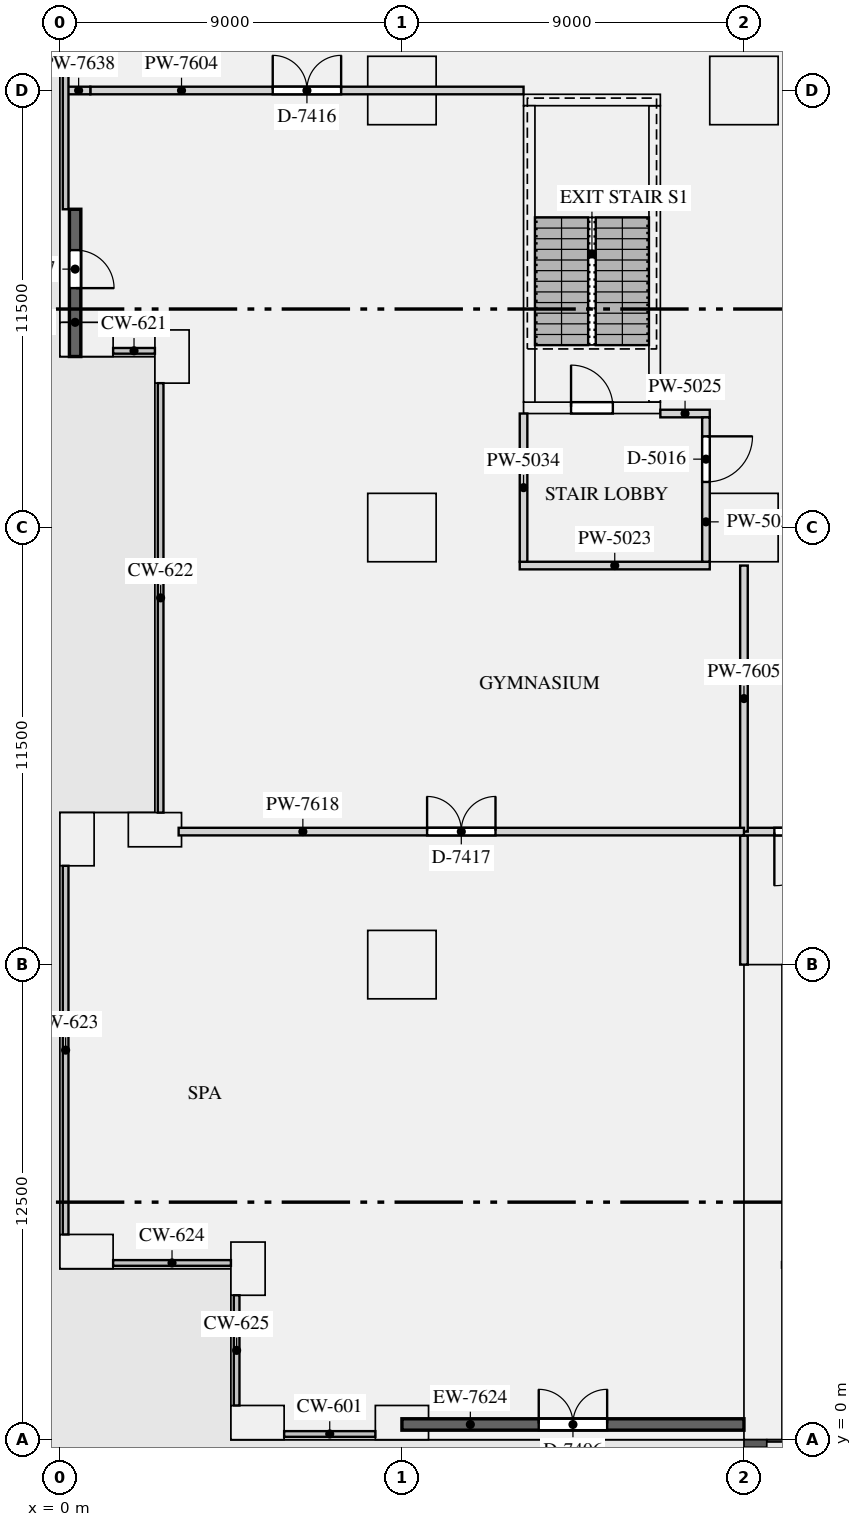
"""IFC4 building model, lengths in metres.
Left out: names, types, materials, properties, quantities, classifications, styles, units other than length and angle.
Written with IfcOpenShell. Run it as: python <this file> out.ifc"""

import sys

from ifc_helpers import new_model, si_unit, direction, frame, frame_2d, origin, origin_2d, place, context, subcontext, project, spatial, rectangle, extrude, element, fill, save


model = new_model("IFC4")
c1 = context("Model", 3, precision=1e-05, world=origin(), true_north=direction((0.0, 1.0)))
c2 = subcontext(c1, "Body", "Model", "MODEL_VIEW")
j1 = project(units=[si_unit("LENGTHUNIT", "METRE"), si_unit("PLANEANGLEUNIT", "RADIAN")], contexts=[c1])
p1 = place(None, origin())
s1 = spatial("IfcSite", under=j1, at=p1, CompositionType="ELEMENT")
p2 = place(p1, origin())
s2 = spatial("IfcBuilding", under=s1, at=p2, CompositionType="ELEMENT")
p3 = place(p2, frame((0.0, 0.0, 11.0)))
s3 = spatial("IfcBuildingStorey", under=s2, at=p3, CompositionType="ELEMENT", Elevation=11.0)
for number, where, z_axis, x_axis in (
    (1, (9.0, 0.45, 0.0), (0.0, 0.0, 1.0), (1.0, 0.0, 0.0)),
    (2, (0.7, 28.95, 0.0), (0.0, 0.0, 1.0), (1.0, 0.0, 0.0)),
    (3, (2.95, 28.5, 0.0), (0.0, 0.0, 1.0), (0.0, -1.0, 0.0)),
    (4, (2.5, 16.05, 0.0), (0.0, 0.0, 1.0), (-1.0, 0.0, 0.0)),
    (5, (0.45, 15.8, 0.0), (0.0, 0.0, 1.0), (0.0, -1.0, 0.0)),
    (6, (0.7, 4.95, 0.0), (0.0, 0.0, 1.0), (1.0, 0.0, 0.0)),
    (7, (4.95, 4.5, 0.0), (0.0, 0.0, 1.0), (0.0, -1.0, 0.0)),
    (8, (5.2, 0.45, 0.0), (0.0, 0.0, 1.0), (1.0, 0.0, 0.0)),
):
    element("IfcColumn", number, at=place(p3, frame(where, z_axis=z_axis, x_axis=x_axis)), inside=s3, PredefinedType="USERDEFINED", context=c2, shape_type="SweptSolid", body=[
        extrude(rectangle(XDim=1.4, YDim=0.9, at=origin_2d()), origin(), (0.0, 0.0, 1.0), 4.5),
    ])
for number, where, z_axis, x_axis in (
    (9, (9.0, 12.5, 0.0), (0.0, 0.0, 1.0), (1.0, 0.0, 0.0)),
    (10, (9.0, 24.0, 0.0), (0.0, 0.0, 1.0), (1.0, 0.0, 0.0)),
    (11, (9.0, 35.5, 0.0), (0.0, 0.0, 1.0), (1.0, 0.0, 0.0)),
    (12, (18.0, 24.0, 0.0), (0.0, 0.0, 1.0), (1.0, 0.0, 0.0)),
    (13, (18.0, 35.5, 0.0), (0.0, 0.0, 1.0), (1.0, 0.0, 0.0)),
):
    element("IfcColumn", number, at=place(p3, frame(where, z_axis=z_axis, x_axis=x_axis)), inside=s3, PredefinedType="COLUMN", context=c2, shape_type="SweptSolid", body=[
        extrude(rectangle(XDim=1.8, YDim=1.8, at=origin_2d()), origin(), (0.0, 0.0, 1.0), 4.5),
    ])
p4 = place(p3, frame((18.5, 0.0, 0.0), z_axis=(0.0, 0.0, 1.0), x_axis=(0.0, 1.0, 0.0)))
e14 = element("IfcWall", 14, at=p4, inside=s3, PredefinedType="SHEAR", context=c2, shape_type="SweptSolid", body=[
    extrude(rectangle(XDim=12.5, YDim=1.0, at=frame_2d((6.25, 0.0))), origin(), (0.0, 0.0, 1.0), 4.5),
])
p5 = place(p3, frame((12.2, 27.15, 0.0), z_axis=(0.0, 0.0, 1.0), x_axis=(1.0, 0.0, 0.0)))
e15 = element("IfcWall", 15, at=p5, inside=s3, PredefinedType="SHEAR", context=c2, shape_type="SweptSolid", body=[
    extrude(rectangle(XDim=3.6, YDim=0.3, at=frame_2d((1.8, 0.0))), origin(), (0.0, 0.0, 1.0), 4.5),
])
p6 = place(p5, frame((1.25, 0.0, 0.0)))
e16 = element("IfcOpeningElement", 16, at=p6, cuts=e15, PredefinedType="OPENING", context=c2, shape_type="SweptSolid", body=[
    extrude(rectangle(XDim=1.1, YDim=2.1, at=frame_2d((0.55, 1.05))), frame((0.0, 0.16, 0.0), z_axis=(0.0, -1.0, 0.0), x_axis=(1.0, 0.0, 0.0)), (0.0, 0.0, 1.0), 0.32),
])
p7 = place(p3, frame((12.2, 35.25, 0.0), z_axis=(0.0, 0.0, 1.0), x_axis=(1.0, 0.0, 0.0)))
e17 = element("IfcWall", 17, at=p7, inside=s3, PredefinedType="SHEAR", context=c2, shape_type="SweptSolid", body=[
    extrude(rectangle(XDim=3.6, YDim=0.3, at=frame_2d((1.8, 0.0))), origin(), (0.0, 0.0, 1.0), 4.5),
])
for number, where, z_axis, x_axis in (
    (18, (12.35, 27.3, 0.0), (0.0, 0.0, 1.0), (0.0, 1.0, 0.0)),
    (19, (15.65, 27.3, 0.0), (0.0, 0.0, 1.0), (0.0, 1.0, 0.0)),
):
    element("IfcWall", number, at=place(p3, frame(where, z_axis=z_axis, x_axis=x_axis)), inside=s3, PredefinedType="SHEAR", context=c2, shape_type="SweptSolid", body=[
        extrude(rectangle(XDim=7.8, YDim=0.3, at=frame_2d((3.9, 0.0))), origin(), (0.0, 0.0, 1.0), 4.5),
    ])
p8 = place(p3, frame((19.0, 4.6, 0.0), z_axis=(0.0, 0.0, 1.0), x_axis=(1.0, 0.0, 0.0)))
e20 = element("IfcWall", 20, at=p8, inside=s3, PredefinedType="PARTITIONING", context=c2, shape_type="SweptSolid", body=[
    extrude(rectangle(XDim=8.3, YDim=0.15, at=frame_2d((4.15, 0.0))), origin(), (0.0, 0.0, 1.0), 3.9),
])
p9 = place(p8, frame((0.45, 0.0, 0.0)))
e21 = element("IfcOpeningElement", 21, at=p9, cuts=e20, PredefinedType="OPENING", context=c2, shape_type="SweptSolid", body=[
    extrude(rectangle(XDim=0.9, YDim=2.1, at=frame_2d((0.45, 1.05))), frame((0.0, 0.085, 0.0), z_axis=(0.0, -1.0, 0.0), x_axis=(1.0, 0.0, 0.0)), (0.0, 0.0, 1.0), 0.17),
])
p10 = place(p3, frame((12.1, 23.0, 0.0), z_axis=(0.0, 0.0, 1.0), x_axis=(1.0, 0.0, 0.0)))
e22 = element("IfcWall", 22, at=p10, inside=s3, PredefinedType="PARTITIONING", context=c2, shape_type="SweptSolid", body=[
    extrude(rectangle(XDim=5.0, YDim=0.2, at=frame_2d((2.5, 0.0))), origin(), (0.0, 0.0, 1.0), 3.9),
])
p11 = place(p3, frame((15.8, 27.0, 0.0), z_axis=(0.0, 0.0, 1.0), x_axis=(1.0, 0.0, 0.0)))
e23 = element("IfcWall", 23, at=p11, inside=s3, PredefinedType="PARTITIONING", context=c2, shape_type="SweptSolid", body=[
    extrude(rectangle(XDim=1.3, YDim=0.2, at=frame_2d((0.65, 0.0))), origin(), (0.0, 0.0, 1.0), 3.9),
])
p12 = place(p3, frame((18.0, 12.5, 0.0), z_axis=(0.0, 0.0, 1.0), x_axis=(0.0, 1.0, 0.0)))
e24 = element("IfcWall", 24, at=p12, inside=s3, PredefinedType="PARTITIONING", context=c2, shape_type="SweptSolid", body=[
    extrude(rectangle(XDim=3.4, YDim=0.2, at=frame_2d((1.7, 0.0))), origin(), (0.0, 0.0, 1.0), 3.9),
])
p13 = place(p3, frame((12.2, 23.1, 0.0), z_axis=(0.0, 0.0, 1.0), x_axis=(0.0, 1.0, 0.0)))
e25 = element("IfcWall", 25, at=p13, inside=s3, PredefinedType="PARTITIONING", context=c2, shape_type="SweptSolid", body=[
    extrude(rectangle(XDim=3.9, YDim=0.2, at=frame_2d((1.95, 0.0))), origin(), (0.0, 0.0, 1.0), 3.9),
])
p14 = place(p3, frame((17.0, 23.1, 0.0), z_axis=(0.0, 0.0, 1.0), x_axis=(0.0, 1.0, 0.0)))
e26 = element("IfcWall", 26, at=p14, inside=s3, PredefinedType="PARTITIONING", context=c2, shape_type="SweptSolid", body=[
    extrude(rectangle(XDim=3.8, YDim=0.2, at=frame_2d((1.9, 0.0))), origin(), (0.0, 0.0, 1.0), 3.9),
])
p15 = place(p14, frame((2.1, 0.0, 0.0)))
e27 = element("IfcOpeningElement", 27, at=p15, cuts=e26, PredefinedType="OPENING", context=c2, shape_type="SweptSolid", body=[
    extrude(rectangle(XDim=1.2, YDim=2.1, at=frame_2d((0.6, 1.05))), frame((0.0, 0.11, 0.0), z_axis=(0.0, -1.0, 0.0), x_axis=(1.0, 0.0, 0.0)), (0.0, 0.0, 1.0), 0.22),
])
p16 = place(p3, frame((17.9, 16.0, 0.0), z_axis=(0.0, 0.0, 1.0), x_axis=(1.0, 0.0, 0.0)))
e28 = element("IfcWall", 28, at=p16, inside=s3, PredefinedType="PARTITIONING", context=c2, shape_type="SweptSolid", body=[
    extrude(rectangle(XDim=36.2, YDim=0.2, at=frame_2d((18.1, 0.0))), origin(), (0.0, 0.0, 1.0), 3.9),
])
p17 = place(p16, frame((0.9, 0.0, 0.0)))
e29 = element("IfcOpeningElement", 29, at=p17, cuts=e28, PredefinedType="OPENING", context=c2, shape_type="SweptSolid", body=[
    extrude(rectangle(XDim=1.4, YDim=2.1, at=frame_2d((0.7, 1.05))), frame((0.0, 0.11, 0.0), z_axis=(0.0, -1.0, 0.0), x_axis=(1.0, 0.0, 0.0)), (0.0, 0.0, 1.0), 0.22),
])
p18 = place(p16, frame((33.9, 0.0, 0.0)))
e30 = element("IfcOpeningElement", 30, at=p18, cuts=e28, PredefinedType="OPENING", context=c2, shape_type="SweptSolid", body=[
    extrude(rectangle(XDim=1.4, YDim=2.1, at=frame_2d((0.7, 1.05))), frame((0.0, 0.11, 0.0), z_axis=(0.0, -1.0, 0.0), x_axis=(1.0, 0.0, 0.0)), (0.0, 0.0, 1.0), 0.22),
])
p19 = place(p3, frame((0.8, 35.5, 0.0), z_axis=(0.0, 0.0, 1.0), x_axis=(1.0, 0.0, 0.0)))
e31 = element("IfcWall", 31, at=p19, inside=s3, PredefinedType="PARTITIONING", context=c2, shape_type="SweptSolid", body=[
    extrude(rectangle(XDim=11.4, YDim=0.2, at=frame_2d((5.7, 0.0))), origin(), (0.0, 0.0, 1.0), 3.9),
])
p20 = place(p19, frame((4.8, 0.0, 0.0)))
e32 = element("IfcOpeningElement", 32, at=p20, cuts=e31, PredefinedType="OPENING", context=c2, shape_type="SweptSolid", body=[
    extrude(rectangle(XDim=1.8, YDim=2.4, at=frame_2d((0.9, 1.2))), frame((0.0, 0.11, 0.0), z_axis=(0.0, -1.0, 0.0), x_axis=(1.0, 0.0, 0.0)), (0.0, 0.0, 1.0), 0.22),
])
p21 = place(p3, frame((18.0, 16.0, 0.0), z_axis=(0.0, 0.0, 1.0), x_axis=(0.0, 1.0, 0.0)))
e33 = element("IfcWall", 33, at=p21, inside=s3, PredefinedType="PARTITIONING", context=c2, shape_type="SweptSolid", body=[
    extrude(rectangle(XDim=7.0, YDim=0.2, at=frame_2d((3.5, 0.0))), origin(), (0.0, 0.0, 1.0), 3.9),
])
p22 = place(p3, frame((3.124, 16.0, 0.0), z_axis=(0.0, 0.0, 1.0), x_axis=(1.0, 0.0, 0.0)))
e34 = element("IfcWall", 34, at=p22, inside=s3, PredefinedType="PARTITIONING", context=c2, shape_type="SweptSolid", body=[
    extrude(rectangle(XDim=14.876, YDim=0.2, at=frame_2d((7.438, 0.0))), origin(), (0.0, 0.0, 1.0), 3.9),
])
p23 = place(p22, frame((6.538, 0.0, 0.0)))
e35 = element("IfcOpeningElement", 35, at=p23, cuts=e34, PredefinedType="OPENING", context=c2, shape_type="SweptSolid", body=[
    extrude(rectangle(XDim=1.8, YDim=2.4, at=frame_2d((0.9, 1.2))), frame((0.0, 0.11, 0.0), z_axis=(0.0, -1.0, 0.0), x_axis=(1.0, 0.0, 0.0)), (0.0, 0.0, 1.0), 0.22),
])
p24 = place(p3, frame((9.0, 0.4, 0.0), z_axis=(0.0, 0.0, 1.0), x_axis=(1.0, 0.0, 0.0)))
e36 = element("IfcWall", 36, at=p24, inside=s3, PredefinedType="SOLIDWALL", context=c2, shape_type="SweptSolid", body=[
    extrude(rectangle(XDim=9.0, YDim=0.3, at=frame_2d((4.5, 0.0))), origin(), (0.0, 0.0, 1.0), 3.9),
])
p25 = place(p24, frame((3.6, 0.0, 0.0)))
e37 = element("IfcOpeningElement", 37, at=p25, cuts=e36, PredefinedType="OPENING", context=c2, shape_type="SweptSolid", body=[
    extrude(rectangle(XDim=1.8, YDim=2.4, at=frame_2d((0.9, 1.2))), frame((0.0, 0.16, 0.0), z_axis=(0.0, -1.0, 0.0), x_axis=(1.0, 0.0, 0.0)), (0.0, 0.0, 1.0), 0.32),
])
p26 = place(p3, frame((0.4, 28.5, 0.0), z_axis=(0.0, 0.0, 1.0), x_axis=(0.0, 1.0, 0.0)))
e38 = element("IfcWall", 38, at=p26, inside=s3, PredefinedType="SOLIDWALL", context=c2, shape_type="SweptSolid", body=[
    extrude(rectangle(XDim=3.875, YDim=0.3, at=frame_2d((1.938, 0.0))), origin(), (0.0, 0.0, 1.0), 3.9),
])
p27 = place(p26, frame((1.8, 0.0, 0.0)))
e39 = element("IfcOpeningElement", 39, at=p27, cuts=e38, PredefinedType="OPENING", context=c2, shape_type="SweptSolid", body=[
    extrude(rectangle(XDim=1.0, YDim=2.1, at=frame_2d((0.5, 1.05))), frame((0.0, 0.16, 0.0), z_axis=(0.0, -1.0, 0.0), x_axis=(1.0, 0.0, 0.0)), (0.0, 0.0, 1.0), 0.32),
])
p28 = place(p3, frame((0.185, 35.5, 0.0), z_axis=(0.0, 0.0, 1.0), x_axis=(1.0, 0.0, 0.0)))
e40 = element("IfcWall", 40, at=p28, inside=s3, PredefinedType="PARTITIONING", context=c2, shape_type="SweptSolid", body=[
    extrude(rectangle(XDim=0.615, YDim=0.2, at=frame_2d((0.308, 0.0))), origin(), (0.0, 0.0, 1.0), 3.9),
])
p29 = place(p6, origin())
e41 = element("IfcDoor", 41, at=p29, inside=s3, OperationType="SINGLE_SWING_LEFT", PredefinedType="DOOR", context=c2, shape_type="SweptSolid", body=[
    extrude(rectangle(XDim=1.1, YDim=2.1, at=frame_2d((0.55, 1.05))), frame((0.0, 0.025, 0.0), z_axis=(0.0, -1.0, 0.0), x_axis=(1.0, 0.0, 0.0)), (0.0, 0.0, 1.0), 0.05),
])
fill(e16, e41)
p30 = place(p15, frame((1.2, 0.0, 0.0), z_axis=(0.0, 0.0, 1.0), x_axis=(-1.0, 0.0, 0.0)))
e42 = element("IfcDoor", 42, at=p30, inside=s3, OperationType="SINGLE_SWING_LEFT", PredefinedType="DOOR", context=c2, shape_type="SweptSolid", body=[
    extrude(rectangle(XDim=1.2, YDim=2.1, at=frame_2d((0.6, 1.05))), frame((0.0, 0.025, 0.0), z_axis=(0.0, -1.0, 0.0), x_axis=(1.0, 0.0, 0.0)), (0.0, 0.0, 1.0), 0.05),
])
fill(e27, e42)
p31 = place(p17, frame((1.4, 0.0, 0.0), z_axis=(0.0, 0.0, 1.0), x_axis=(-1.0, 0.0, 0.0)))
e43 = element("IfcDoor", 43, at=p31, inside=s3, OperationType="SINGLE_SWING_RIGHT", PredefinedType="DOOR", context=c2, shape_type="SweptSolid", body=[
    extrude(rectangle(XDim=1.4, YDim=2.1, at=frame_2d((0.7, 1.05))), frame((0.0, 0.025, 0.0), z_axis=(0.0, -1.0, 0.0), x_axis=(1.0, 0.0, 0.0)), (0.0, 0.0, 1.0), 0.05),
])
fill(e29, e43)
p32 = place(p25, origin())
e44 = element("IfcDoor", 44, at=p32, inside=s3, OperationType="DOUBLE_DOOR_SINGLE_SWING", PredefinedType="DOOR", context=c2, shape_type="SweptSolid", body=[
    extrude(rectangle(XDim=1.8, YDim=2.4, at=frame_2d((0.9, 1.2))), frame((0.0, 0.025, 0.0), z_axis=(0.0, -1.0, 0.0), x_axis=(1.0, 0.0, 0.0)), (0.0, 0.0, 1.0), 0.05),
])
fill(e37, e44)
p33 = place(p27, frame((1.0, 0.0, 0.0), z_axis=(0.0, 0.0, 1.0), x_axis=(-1.0, 0.0, 0.0)))
e45 = element("IfcDoor", 45, at=p33, inside=s3, OperationType="SINGLE_SWING_RIGHT", PredefinedType="DOOR", context=c2, shape_type="SweptSolid", body=[
    extrude(rectangle(XDim=1.0, YDim=2.1, at=frame_2d((0.5, 1.05))), frame((0.0, 0.025, 0.0), z_axis=(0.0, -1.0, 0.0), x_axis=(1.0, 0.0, 0.0)), (0.0, 0.0, 1.0), 0.05),
])
fill(e39, e45)
p34 = place(p20, origin())
e46 = element("IfcDoor", 46, at=p34, inside=s3, OperationType="DOUBLE_DOOR_SINGLE_SWING", PredefinedType="DOOR", context=c2, shape_type="SweptSolid", body=[
    extrude(rectangle(XDim=1.8, YDim=2.4, at=frame_2d((0.9, 1.2))), frame((0.0, 0.025, 0.0), z_axis=(0.0, -1.0, 0.0), x_axis=(1.0, 0.0, 0.0)), (0.0, 0.0, 1.0), 0.05),
])
fill(e32, e46)
p35 = place(p23, origin())
e47 = element("IfcDoor", 47, at=p35, inside=s3, OperationType="DOUBLE_DOOR_SINGLE_SWING", PredefinedType="DOOR", context=c2, shape_type="SweptSolid", body=[
    extrude(rectangle(XDim=1.8, YDim=2.4, at=frame_2d((0.9, 1.2))), frame((0.0, 0.025, 0.0), z_axis=(0.0, -1.0, 0.0), x_axis=(1.0, 0.0, 0.0)), (0.0, 0.0, 1.0), 0.05),
])
fill(e35, e47)
save(model, sys.argv[1])
